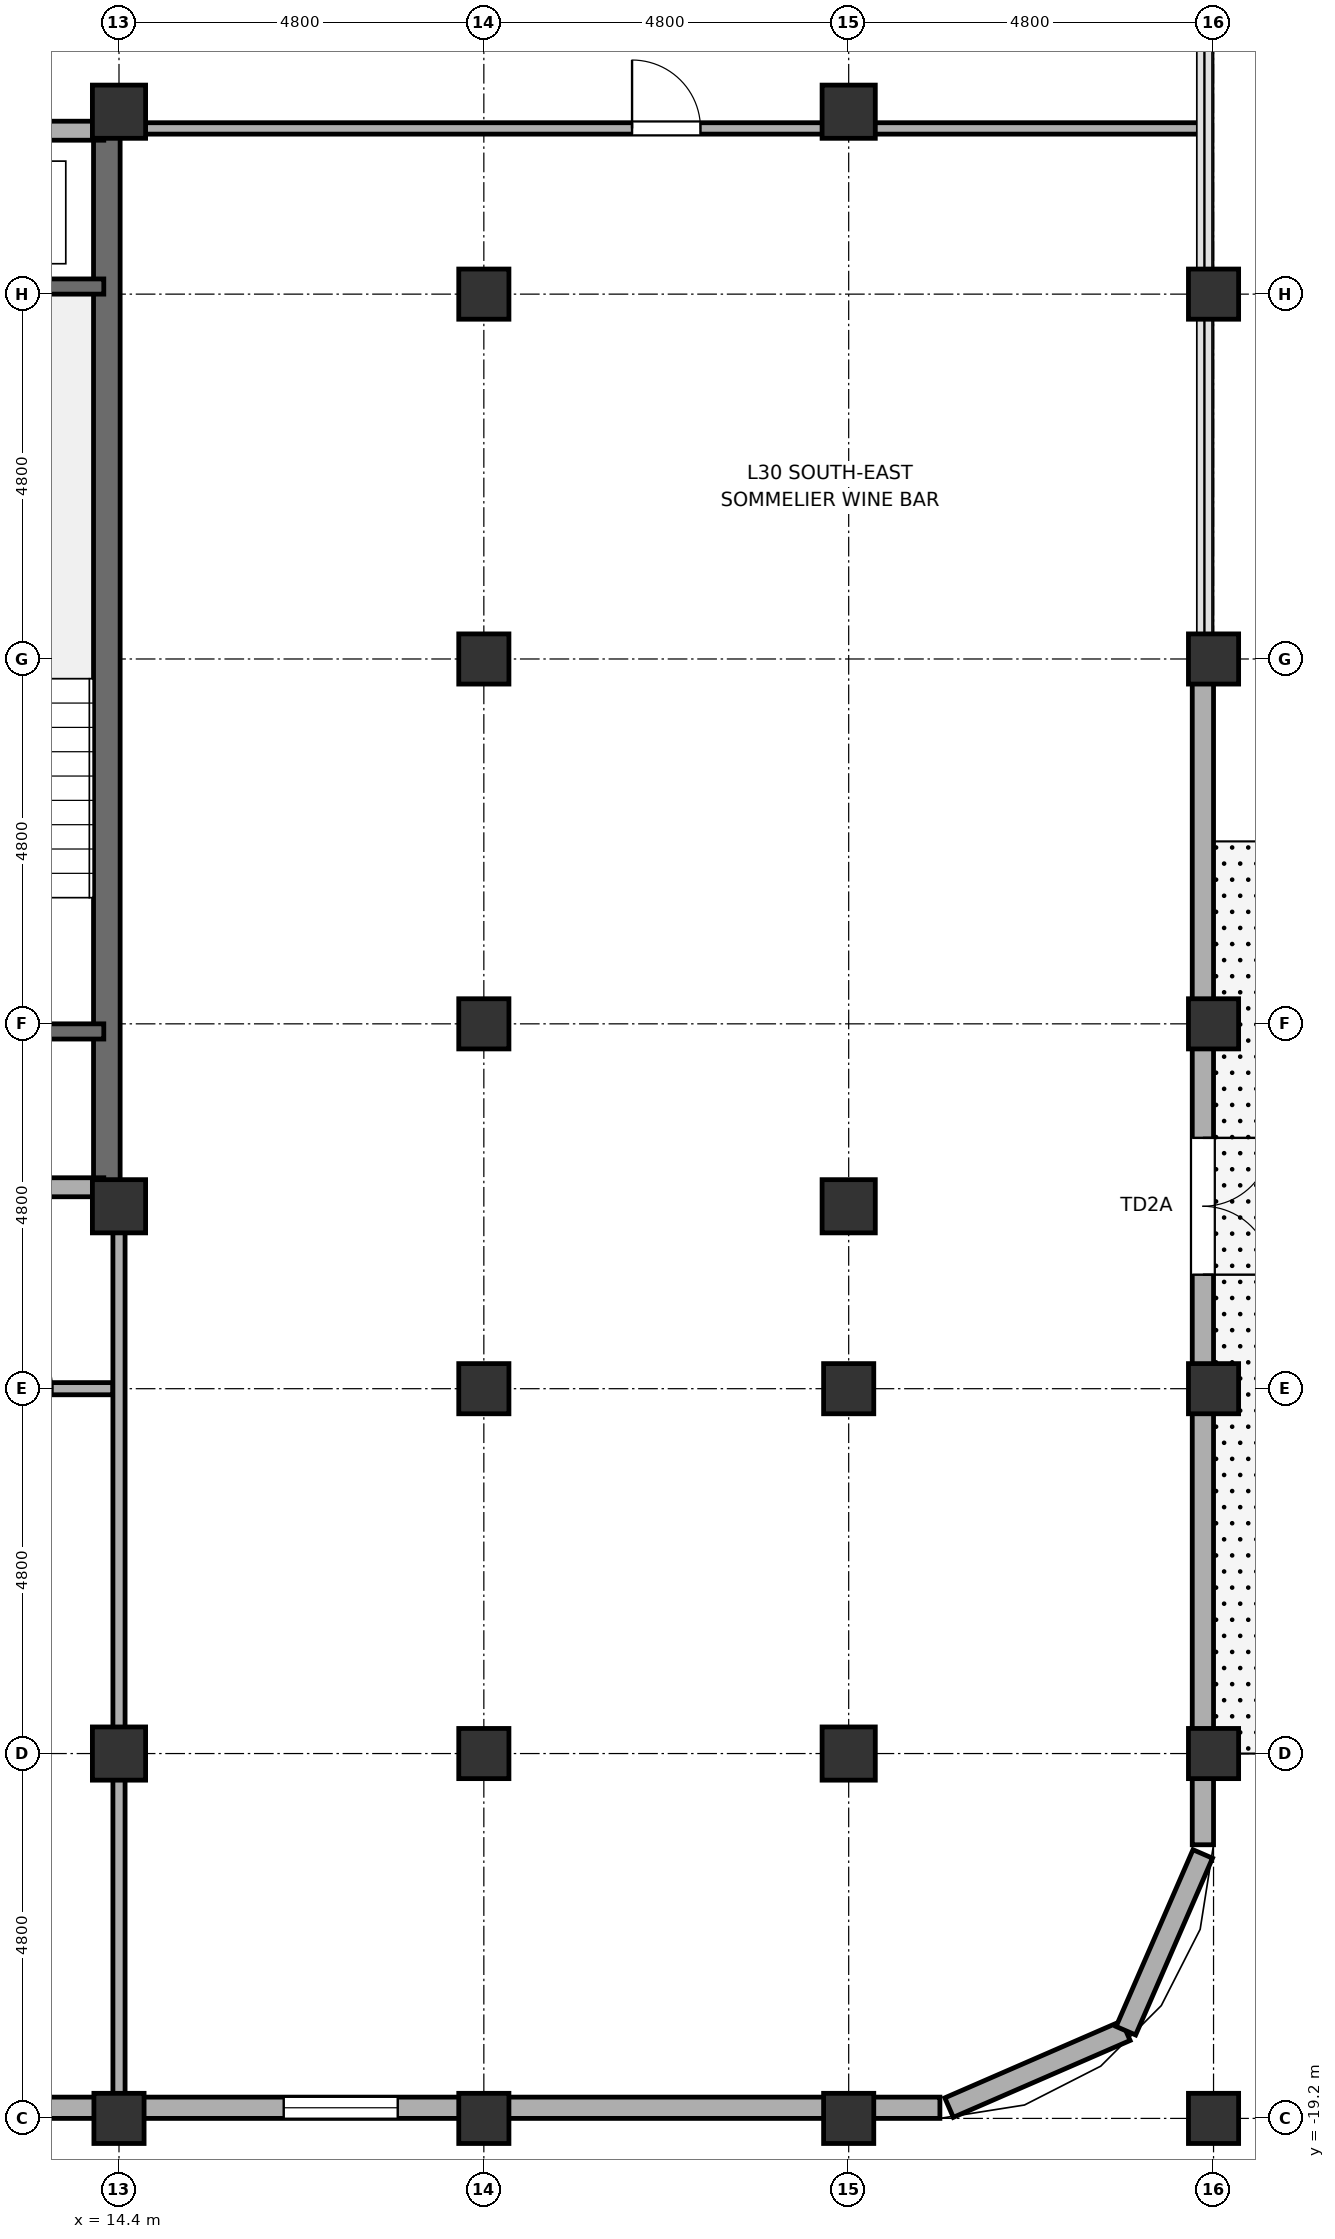
"""IFC4 building model, lengths in metres.
Left out: names, types, materials, properties, quantities, classifications, styles, units other than length and angle.
Written with IfcOpenShell. Run it as: python <this file> out.ifc"""

import sys

from ifc_helpers import new_model, si_unit, direction, frame, frame_2d, origin, origin_2d, place, context, subcontext, project, spatial, rectangle, hollow_rectangle, hollow_circle, extrude, element, fill, save


model = new_model("IFC4")
c1 = context("Model", 3, precision=1e-05, world=origin(), true_north=direction((0.0, 1.0)))
c2 = subcontext(c1, "Body", "Model", "MODEL_VIEW")
j1 = project(units=[si_unit("LENGTHUNIT", "METRE"), si_unit("PLANEANGLEUNIT", "RADIAN")], contexts=[c1])
p1 = place(None, origin())
s1 = spatial("IfcSite", under=j1, at=p1, CompositionType="ELEMENT")
p2 = place(p1, origin())
s2 = spatial("IfcBuilding", under=s1, at=p2, CompositionType="ELEMENT")
p3 = place(p2, frame((0.0, 0.0, 124.8)))
s3 = spatial("IfcBuildingStorey", under=s2, at=p3, CompositionType="ELEMENT", Elevation=124.8)
p4 = place(p3, frame((14.4, -19.2, 0.0), z_axis=(0.0, 0.0, 1.0), x_axis=(1.0, 0.0, 0.0)))
e1 = element("IfcColumn", 1, at=p4, inside=s3, PredefinedType="COLUMN", context=c2, shape_type="SweptSolid", body=[
    extrude(hollow_circle(Radius=0.33, WallThickness=0.028, at=origin_2d()), origin(), (0.0, 0.0, 1.0), 3.7),
])
for number, where, z_axis, x_axis in (
    (2, (14.4, -14.4, 0.0), (0.0, 0.0, 1.0), (1.0, 0.0, 0.0)),
    (3, (14.4, -7.2, 0.0), (0.0, 0.0, 1.0), (1.0, 0.0, 0.0)),
    (4, (14.4, 7.2, 0.0), (0.0, 0.0, 1.0), (1.0, 0.0, 0.0)),
):
    element("IfcColumn", number, at=place(p3, frame(where, z_axis=z_axis, x_axis=x_axis)), inside=s3, PredefinedType="COLUMN", context=c2, shape_type="SweptSolid", body=[
        extrude(hollow_rectangle(XDim=0.7, YDim=0.7, WallThickness=0.032, at=origin_2d()), origin(), (0.0, 0.0, 1.0), 3.7),
    ])
for number, where, z_axis, x_axis in (
    (5, (19.2, -19.2, 0.0), (0.0, 0.0, 1.0), (1.0, 0.0, 0.0)),
    (6, (19.2, -14.4, 0.0), (0.0, 0.0, 1.0), (1.0, 0.0, 0.0)),
    (7, (19.2, -9.6, 0.0), (0.0, 0.0, 1.0), (1.0, 0.0, 0.0)),
    (8, (19.2, -4.8, 0.0), (0.0, 0.0, 1.0), (1.0, 0.0, 0.0)),
    (9, (19.2, 0.0, 0.0), (0.0, 0.0, 1.0), (1.0, 0.0, 0.0)),
    (10, (19.2, 4.8, 0.0), (0.0, 0.0, 1.0), (1.0, 0.0, 0.0)),
    (11, (24.0, -19.2, 0.0), (0.0, 0.0, 1.0), (1.0, 0.0, 0.0)),
):
    element("IfcColumn", number, at=place(p3, frame(where, z_axis=z_axis, x_axis=x_axis)), inside=s3, PredefinedType="COLUMN", context=c2, shape_type="SweptSolid", body=[
        extrude(hollow_circle(Radius=0.33, WallThickness=0.028, at=origin_2d()), origin(), (0.0, 0.0, 1.0), 3.7),
    ])
p5 = place(p3, frame((24.0, -14.4, 0.0), z_axis=(0.0, 0.0, 1.0), x_axis=(1.0, 0.0, 0.0)))
e12 = element("IfcColumn", 12, at=p5, inside=s3, PredefinedType="COLUMN", context=c2, shape_type="SweptSolid", body=[
    extrude(hollow_rectangle(XDim=0.7, YDim=0.7, WallThickness=0.032, at=origin_2d()), origin(), (0.0, 0.0, 1.0), 3.7),
])
p6 = place(p3, frame((24.0, -9.6, 0.0), z_axis=(0.0, 0.0, 1.0), x_axis=(1.0, 0.0, 0.0)))
e13 = element("IfcColumn", 13, at=p6, inside=s3, PredefinedType="COLUMN", context=c2, shape_type="SweptSolid", body=[
    extrude(hollow_circle(Radius=0.33, WallThickness=0.028, at=origin_2d()), origin(), (0.0, 0.0, 1.0), 3.7),
])
for number, where, z_axis, x_axis in (
    (14, (24.0, -7.2, 0.0), (0.0, 0.0, 1.0), (1.0, 0.0, 0.0)),
    (15, (24.0, 7.2, 0.0), (0.0, 0.0, 1.0), (1.0, 0.0, 0.0)),
):
    element("IfcColumn", number, at=place(p3, frame(where, z_axis=z_axis, x_axis=x_axis)), inside=s3, PredefinedType="COLUMN", context=c2, shape_type="SweptSolid", body=[
        extrude(hollow_rectangle(XDim=0.7, YDim=0.7, WallThickness=0.032, at=origin_2d()), origin(), (0.0, 0.0, 1.0), 3.7),
    ])
for number, where, z_axis, x_axis in (
    (16, (28.8, -19.2, 0.0), (0.0, 0.0, 1.0), (1.0, 0.0, 0.0)),
    (17, (28.8, -14.4, 0.0), (0.0, 0.0, 1.0), (1.0, 0.0, 0.0)),
    (18, (28.8, -9.6, 0.0), (0.0, 0.0, 1.0), (1.0, 0.0, 0.0)),
    (19, (28.8, -4.8, 0.0), (0.0, 0.0, 1.0), (1.0, 0.0, 0.0)),
    (20, (28.8, 0.0, 0.0), (0.0, 0.0, 1.0), (1.0, 0.0, 0.0)),
    (21, (28.8, 4.8, 0.0), (0.0, 0.0, 1.0), (1.0, 0.0, 0.0)),
):
    element("IfcColumn", number, at=place(p3, frame(where, z_axis=z_axis, x_axis=x_axis)), inside=s3, PredefinedType="COLUMN", context=c2, shape_type="SweptSolid", body=[
        extrude(hollow_circle(Radius=0.33, WallThickness=0.028, at=origin_2d()), origin(), (0.0, 0.0, 1.0), 3.7),
    ])
p7 = place(p3, frame((14.24, -7.2, -0.18), z_axis=(0.0, 0.0, 1.0), x_axis=(0.0, 1.0, 0.0)))
e22 = element("IfcWall", 22, at=p7, inside=s3, PredefinedType="SHEAR", context=c2, shape_type="SweptSolid", body=[
    extrude(rectangle(XDim=14.4, YDim=0.35, at=frame_2d((7.2, 0.0))), origin(), (0.0, 0.0, 1.0), 3.7),
])
p8 = place(p3, frame((25.321, -19.058, 0.0), z_axis=(0.0, 0.0, 1.0), x_axis=(0.917060872934, 0.398747232384, 0.0)))
e23 = element("IfcWall", 23, at=p8, inside=s3, PredefinedType="SOLIDWALL", context=c2, shape_type="SweptSolid", body=[
    extrude(rectangle(XDim=2.536, YDim=0.28, at=frame_2d((1.268, 0.0))), origin(), (0.0, 0.0, 1.0), 2.12),
])
p9 = place(p3, frame((27.646, -18.047, 0.0), z_axis=(0.0, 0.0, 1.0), x_axis=(0.398792985289, 0.917040977756, 0.0)))
e24 = element("IfcWall", 24, at=p9, inside=s3, PredefinedType="SOLIDWALL", context=c2, shape_type="SweptSolid", body=[
    extrude(rectangle(XDim=2.536, YDim=0.28, at=frame_2d((1.268, 0.0))), origin(), (0.0, 0.0, 1.0), 2.87),
])
p10 = place(p3, frame((4.75, -19.06, 0.0), z_axis=(0.0, 0.0, 1.0), x_axis=(1.0, 0.0, 0.0)))
e25 = element("IfcWall", 25, at=p10, inside=s3, PredefinedType="SOLIDWALL", context=c2, shape_type="SweptSolid", body=[
    extrude(rectangle(XDim=20.45, YDim=0.28, at=frame_2d((10.225, 0.0))), origin(), (0.0, 0.0, 1.0), 2.12),
])
p11 = place(p10, frame((11.817, 0.0, 0.75)))
e26 = element("IfcOpeningElement", 26, at=p11, cuts=e25, PredefinedType="OPENING", context=c2, shape_type="SweptSolid", body=[
    extrude(rectangle(XDim=1.5, YDim=1.15, at=frame_2d((0.75, 0.575))), frame((0.0, 0.155, 0.0), z_axis=(0.0, -1.0, 0.0), x_axis=(1.0, 0.0, 0.0)), (0.0, 0.0, 1.0), 0.31),
])
p12 = place(p10, frame((1.7, 0.0, 0.75)))
e27 = element("IfcOpeningElement", 27, at=p12, cuts=e25, PredefinedType="OPENING", context=c2, shape_type="SweptSolid", body=[
    extrude(rectangle(XDim=1.5, YDim=1.15, at=frame_2d((0.75, 0.575))), frame((0.0, 0.155, 0.0), z_axis=(0.0, -1.0, 0.0), x_axis=(1.0, 0.0, 0.0)), (0.0, 0.0, 1.0), 0.31),
])
p13 = place(p10, frame((6.5, 0.0, 0.75)))
e28 = element("IfcOpeningElement", 28, at=p13, cuts=e25, PredefinedType="OPENING", context=c2, shape_type="SweptSolid", body=[
    extrude(rectangle(XDim=1.5, YDim=1.15, at=frame_2d((0.75, 0.575))), frame((0.0, 0.155, 0.0), z_axis=(0.0, -1.0, 0.0), x_axis=(1.0, 0.0, 0.0)), (0.0, 0.0, 1.0), 0.31),
])
p14 = place(p3, frame((28.66, -15.6, 0.0), z_axis=(0.0, 0.0, 1.0), x_axis=(0.0, 1.0, 0.0)))
e29 = element("IfcWall", 29, at=p14, inside=s3, PredefinedType="SOLIDWALL", context=c2, shape_type="SweptSolid", body=[
    extrude(rectangle(XDim=15.58, YDim=0.28, at=frame_2d((7.79, 0.0))), origin(), (0.0, 0.0, 1.0), 2.12),
])
p15 = place(p14, frame((7.5, 0.0, 0.0)))
e30 = element("IfcOpeningElement", 30, at=p15, cuts=e29, PredefinedType="OPENING", context=c2, shape_type="SweptSolid", body=[
    extrude(rectangle(XDim=1.8, YDim=2.02, at=frame_2d((0.9, 1.01))), frame((0.0, 0.155, 0.0), z_axis=(0.0, -1.0, 0.0), x_axis=(1.0, 0.0, 0.0)), (0.0, 0.0, 1.0), 0.31),
])
p16 = place(p3, frame((4.8, -6.95, 0.0), z_axis=(0.0, 0.0, 1.0), x_axis=(1.0, 0.0, 0.0)))
e31 = element("IfcWall", 31, at=p16, inside=s3, PredefinedType="SOLIDWALL", context=c2, shape_type="SweptSolid", body=[
    extrude(rectangle(XDim=9.4, YDim=0.25, at=frame_2d((4.7, 0.0))), origin(), (0.0, 0.0, 1.0), 2.12),
])
p17 = place(p16, frame((3.5, 0.0, 0.0)))
e32 = element("IfcOpeningElement", 32, at=p17, cuts=e31, PredefinedType="OPENING", context=c2, shape_type="SweptSolid", body=[
    extrude(rectangle(XDim=1.0, YDim=2.02, at=frame_2d((0.5, 1.01))), frame((0.0, 0.14, 0.0), z_axis=(0.0, -1.0, 0.0), x_axis=(1.0, 0.0, 0.0)), (0.0, 0.0, 1.0), 0.28),
])
p18 = place(p16, frame((0.95, 0.0, 0.0)))
e33 = element("IfcOpeningElement", 33, at=p18, cuts=e31, PredefinedType="OPENING", context=c2, shape_type="SweptSolid", body=[
    extrude(rectangle(XDim=0.9, YDim=2.02, at=frame_2d((0.45, 1.01))), frame((0.0, 0.14, 0.0), z_axis=(0.0, -1.0, 0.0), x_axis=(1.0, 0.0, 0.0)), (0.0, 0.0, 1.0), 0.28),
])
p19 = place(p3, frame((4.8, 6.95, 0.0), z_axis=(0.0, 0.0, 1.0), x_axis=(1.0, 0.0, 0.0)))
e34 = element("IfcWall", 34, at=p19, inside=s3, PredefinedType="SOLIDWALL", context=c2, shape_type="SweptSolid", body=[
    extrude(rectangle(XDim=9.4, YDim=0.25, at=frame_2d((4.7, 0.0))), origin(), (0.0, 0.0, 1.0), 2.12),
])
p20 = place(p19, frame((3.5, 0.0, 0.0)))
e35 = element("IfcOpeningElement", 35, at=p20, cuts=e34, PredefinedType="OPENING", context=c2, shape_type="SweptSolid", body=[
    extrude(rectangle(XDim=1.2, YDim=2.02, at=frame_2d((0.6, 1.01))), frame((0.0, 0.14, 0.0), z_axis=(0.0, -1.0, 0.0), x_axis=(1.0, 0.0, 0.0)), (0.0, 0.0, 1.0), 0.28),
])
for number, where, z_axis, x_axis in (
    (36, (10.55, -4.9, -0.18), (0.0, 0.0, 1.0), (1.0, 0.0, 0.0)),
    (37, (10.55, 4.9, -0.18), (0.0, 0.0, 1.0), (1.0, 0.0, 0.0)),
):
    element("IfcWall", number, at=place(p3, frame(where, z_axis=z_axis, x_axis=x_axis)), inside=s3, PredefinedType="SOLIDWALL", context=c2, shape_type="SweptSolid", body=[
        extrude(rectangle(XDim=3.65, YDim=0.2, at=frame_2d((1.825, 0.0))), origin(), (0.0, 0.0, 1.0), 3.7),
    ])
p21 = place(p3, frame((-14.32, -9.6, 0.0), z_axis=(0.0, 0.0, 1.0), x_axis=(1.0, 0.0, 0.0)))
e38 = element("IfcWall", 38, at=p21, inside=s3, PredefinedType="PARTITIONING", context=c2, shape_type="SweptSolid", body=[
    extrude(rectangle(XDim=28.64, YDim=0.16, at=frame_2d((14.32, 0.0))), origin(), (0.0, 0.0, 1.0), 2.12),
])
p22 = place(p21, frame((0.795, 0.0, 0.0)))
e39 = element("IfcOpeningElement", 39, at=p22, cuts=e38, PredefinedType="OPENING", context=c2, shape_type="SweptSolid", body=[
    extrude(rectangle(XDim=0.92, YDim=2.02, at=frame_2d((0.46, 1.01))), frame((0.0, 0.095, 0.0), z_axis=(0.0, -1.0, 0.0), x_axis=(1.0, 0.0, 0.0)), (0.0, 0.0, 1.0), 0.19),
])
p23 = place(p21, frame((7.725, 0.0, 0.0)))
e40 = element("IfcOpeningElement", 40, at=p23, cuts=e38, PredefinedType="OPENING", context=c2, shape_type="SweptSolid", body=[
    extrude(rectangle(XDim=0.92, YDim=2.02, at=frame_2d((0.46, 1.01))), frame((0.0, 0.095, 0.0), z_axis=(0.0, -1.0, 0.0), x_axis=(1.0, 0.0, 0.0)), (0.0, 0.0, 1.0), 0.19),
])
p24 = place(p21, frame((10.395, 0.0, 0.0)))
e41 = element("IfcOpeningElement", 41, at=p24, cuts=e38, PredefinedType="OPENING", context=c2, shape_type="SweptSolid", body=[
    extrude(rectangle(XDim=0.92, YDim=2.02, at=frame_2d((0.46, 1.01))), frame((0.0, 0.095, 0.0), z_axis=(0.0, -1.0, 0.0), x_axis=(1.0, 0.0, 0.0)), (0.0, 0.0, 1.0), 0.19),
])
p25 = place(p21, frame((17.325, 0.0, 0.0)))
e42 = element("IfcOpeningElement", 42, at=p25, cuts=e38, PredefinedType="OPENING", context=c2, shape_type="SweptSolid", body=[
    extrude(rectangle(XDim=0.92, YDim=2.02, at=frame_2d((0.46, 1.01))), frame((0.0, 0.095, 0.0), z_axis=(0.0, -1.0, 0.0), x_axis=(1.0, 0.0, 0.0)), (0.0, 0.0, 1.0), 0.19),
])
p26 = place(p21, frame((19.995, 0.0, 0.0)))
e43 = element("IfcOpeningElement", 43, at=p26, cuts=e38, PredefinedType="OPENING", context=c2, shape_type="SweptSolid", body=[
    extrude(rectangle(XDim=0.92, YDim=2.02, at=frame_2d((0.46, 1.01))), frame((0.0, 0.095, 0.0), z_axis=(0.0, -1.0, 0.0), x_axis=(1.0, 0.0, 0.0)), (0.0, 0.0, 1.0), 0.19),
])
p27 = place(p21, frame((26.925, 0.0, 0.0)))
e44 = element("IfcOpeningElement", 44, at=p27, cuts=e38, PredefinedType="OPENING", context=c2, shape_type="SweptSolid", body=[
    extrude(rectangle(XDim=0.92, YDim=2.02, at=frame_2d((0.46, 1.01))), frame((0.0, 0.095, 0.0), z_axis=(0.0, -1.0, 0.0), x_axis=(1.0, 0.0, 0.0)), (0.0, 0.0, 1.0), 0.19),
])
p28 = place(p3, frame((14.52, 6.98, 0.0), z_axis=(0.0, 0.0, 1.0), x_axis=(1.0, 0.0, 0.0)))
e45 = element("IfcWall", 45, at=p28, inside=s3, PredefinedType="PARTITIONING", context=c2, shape_type="SweptSolid", body=[
    extrude(rectangle(XDim=14.11, YDim=0.15, at=frame_2d((7.055, 0.0))), origin(), (0.0, 0.0, 1.0), 2.12),
])
p29 = place(p28, frame((6.63, 0.0, 0.0)))
e46 = element("IfcOpeningElement", 46, at=p29, cuts=e45, PredefinedType="OPENING", context=c2, shape_type="SweptSolid", body=[
    extrude(rectangle(XDim=0.9, YDim=2.02, at=frame_2d((0.45, 1.01))), frame((0.0, 0.09, 0.0), z_axis=(0.0, -1.0, 0.0), x_axis=(1.0, 0.0, 0.0)), (0.0, 0.0, 1.0), 0.18),
])
p30 = place(p3, frame((14.4, -18.91, 0.0), z_axis=(0.0, 0.0, 1.0), x_axis=(0.0, 1.0, 0.0)))
e47 = element("IfcWall", 47, at=p30, inside=s3, PredefinedType="PARTITIONING", context=c2, shape_type="SweptSolid", body=[
    extrude(rectangle(XDim=11.67, YDim=0.16, at=frame_2d((5.835, 0.0))), origin(), (0.0, 0.0, 1.0), 2.12),
])
p31 = place(p15, origin())
e48 = element("IfcDoor", 48, at=p31, inside=s3, OperationType="DOUBLE_DOOR_SINGLE_SWING", PredefinedType="DOOR", context=c2, shape_type="SweptSolid", body=[
    extrude(rectangle(XDim=1.8, YDim=2.02, at=frame_2d((0.9, 1.01))), frame((0.0, 0.025, 0.0), z_axis=(0.0, -1.0, 0.0), x_axis=(1.0, 0.0, 0.0)), (0.0, 0.0, 1.0), 0.05),
])
fill(e30, e48)
p32 = place(p11, origin())
e49 = element("IfcWindow", 49, at=p32, inside=s3, PartitioningType="SINGLE_PANEL", PredefinedType="WINDOW", context=c2, shape_type="SweptSolid", body=[
    extrude(rectangle(XDim=1.5, YDim=1.15, at=frame_2d((0.75, 0.575))), frame((0.0, 0.03, 0.0), z_axis=(0.0, -1.0, 0.0), x_axis=(1.0, 0.0, 0.0)), (0.0, 0.0, 1.0), 0.06),
])
fill(e26, e49)
p33 = place(p29, origin())
e50 = element("IfcDoor", 50, at=p33, inside=s3, OperationType="SINGLE_SWING_LEFT", PredefinedType="DOOR", context=c2, shape_type="SweptSolid", body=[
    extrude(rectangle(XDim=0.9, YDim=2.02, at=frame_2d((0.45, 1.01))), frame((0.0, 0.025, 0.0), z_axis=(0.0, -1.0, 0.0), x_axis=(1.0, 0.0, 0.0)), (0.0, 0.0, 1.0), 0.05),
])
fill(e46, e50)
p34 = place(p27, origin())
e51 = element("IfcDoor", 51, at=p34, inside=s3, OperationType="SINGLE_SWING_LEFT", PredefinedType="DOOR", context=c2, shape_type="SweptSolid", body=[
    extrude(rectangle(XDim=0.92, YDim=2.02, at=frame_2d((0.46, 1.01))), frame((0.0, 0.025, 0.0), z_axis=(0.0, -1.0, 0.0), x_axis=(1.0, 0.0, 0.0)), (0.0, 0.0, 1.0), 0.05),
])
fill(e44, e51)
save(model, sys.argv[1])
